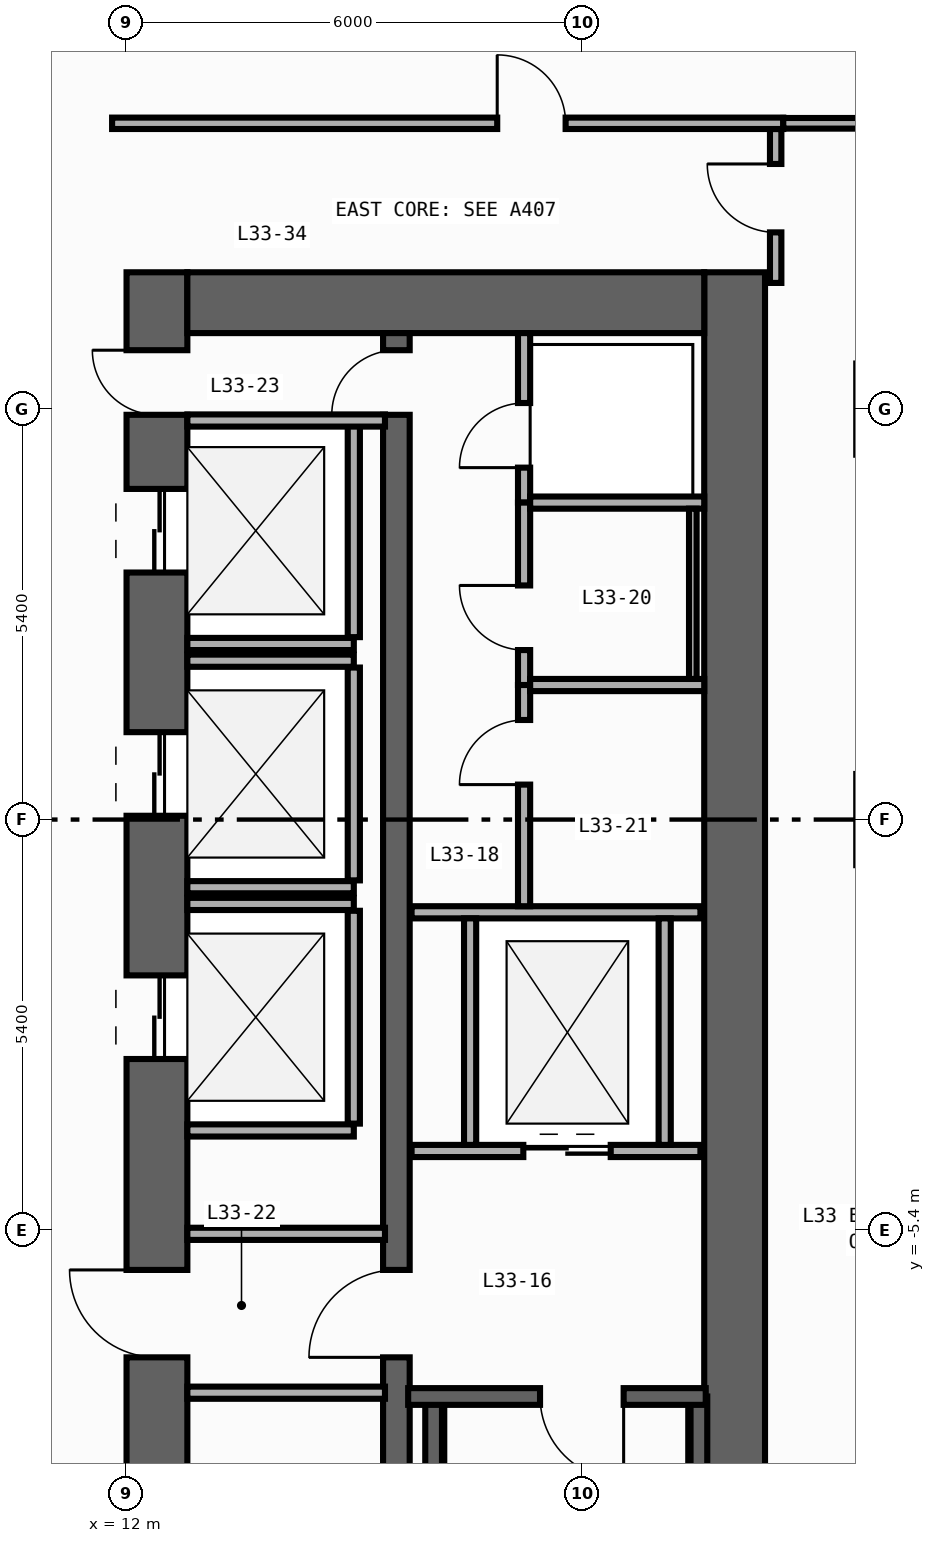
"""IFC4 building model, lengths in metres.
Left out: names, types, materials, properties, quantities, classifications, styles, units other than length and angle.
Written with IfcOpenShell. Run it as: python <this file> out.ifc"""

import sys

from ifc_helpers import new_model, si_unit, direction, frame, frame_2d, origin, origin_2d, place, context, subcontext, project, spatial, rectangle, extrude, element, fill, save


model = new_model("IFC4")
c1 = context("Model", 3, precision=1e-05, world=origin(), true_north=direction((0.0, 1.0)))
c2 = subcontext(c1, "Body", "Model", "MODEL_VIEW")
j1 = project(units=[si_unit("LENGTHUNIT", "METRE"), si_unit("PLANEANGLEUNIT", "RADIAN")], contexts=[c1])
p1 = place(None, origin())
s1 = spatial("IfcSite", under=j1, at=p1, CompositionType="ELEMENT")
p2 = place(p1, origin())
s2 = spatial("IfcBuilding", under=s1, at=p2, CompositionType="ELEMENT")
p3 = place(p2, frame((0.0, 0.0, 143.6)))
s3 = spatial("IfcBuildingStorey", under=s2, at=p3, CompositionType="ELEMENT", Elevation=143.6)
p4 = place(p3, frame((12.4, -19.8, 0.0), z_axis=(0.0, 0.0, 1.0), x_axis=(0.0, 1.0, 0.0)))
e1 = element("IfcWall", 1, at=p4, inside=s3, PredefinedType="SHEAR", context=c2, shape_type="SweptSolid", body=[
    extrude(rectangle(XDim=27.0, YDim=0.8, at=frame_2d((13.5, 0.0))), origin(), (0.0, 0.0, 1.0), 3.94),
])
p5 = place(p4, frame((23.05, 0.0, 0.0)))
e2 = element("IfcOpeningElement", 2, at=p5, cuts=e1, PredefinedType="OPENING", context=c2, shape_type="SweptSolid", body=[
    extrude(rectangle(XDim=1.1, YDim=2.2, at=frame_2d((0.55, 1.1))), frame((0.0, 0.41, 0.0), z_axis=(0.0, -1.0, 0.0), x_axis=(1.0, 0.0, 0.0)), (0.0, 0.0, 1.0), 0.82),
])
p6 = place(p4, frame((19.85, 0.0, 0.0)))
e3 = element("IfcOpeningElement", 3, at=p6, cuts=e1, PredefinedType="OPENING", context=c2, shape_type="SweptSolid", body=[
    extrude(rectangle(XDim=1.1, YDim=2.2, at=frame_2d((0.55, 1.1))), frame((0.0, 0.41, 0.0), z_axis=(0.0, -1.0, 0.0), x_axis=(1.0, 0.0, 0.0)), (0.0, 0.0, 1.0), 0.82),
])
p7 = place(p4, frame((16.65, 0.0, 0.0)))
e4 = element("IfcOpeningElement", 4, at=p7, cuts=e1, PredefinedType="OPENING", context=c2, shape_type="SweptSolid", body=[
    extrude(rectangle(XDim=1.1, YDim=2.2, at=frame_2d((0.55, 1.1))), frame((0.0, 0.41, 0.0), z_axis=(0.0, -1.0, 0.0), x_axis=(1.0, 0.0, 0.0)), (0.0, 0.0, 1.0), 0.82),
])
p8 = place(p4, frame((10.175, 0.0, 0.0)))
e5 = element("IfcOpeningElement", 5, at=p8, cuts=e1, PredefinedType="OPENING", context=c2, shape_type="SweptSolid", body=[
    extrude(rectangle(XDim=0.85, YDim=2.1, at=frame_2d((0.425, 1.05))), frame((0.0, 0.41, 0.0), z_axis=(0.0, -1.0, 0.0), x_axis=(1.0, 0.0, 0.0)), (0.0, 0.0, 1.0), 0.82),
])
p9 = place(p4, frame((12.725, 0.0, 0.0)))
e6 = element("IfcOpeningElement", 6, at=p9, cuts=e1, PredefinedType="OPENING", context=c2, shape_type="SweptSolid", body=[
    extrude(rectangle(XDim=1.15, YDim=2.2, at=frame_2d((0.575, 1.1))), frame((0.0, 0.41, 0.0), z_axis=(0.0, -1.0, 0.0), x_axis=(1.0, 0.0, 0.0)), (0.0, 0.0, 1.0), 0.82),
])
p10 = place(p4, frame((25.125, 0.0, 0.0)))
e7 = element("IfcOpeningElement", 7, at=p10, cuts=e1, PredefinedType="OPENING", context=c2, shape_type="SweptSolid", body=[
    extrude(rectangle(XDim=0.85, YDim=2.1, at=frame_2d((0.425, 1.05))), frame((0.0, 0.41, 0.0), z_axis=(0.0, -1.0, 0.0), x_axis=(1.0, 0.0, 0.0)), (0.0, 0.0, 1.0), 0.82),
])
p11 = place(p3, frame((20.0, -19.8, 0.0), z_axis=(0.0, 0.0, 1.0), x_axis=(0.0, 1.0, 0.0)))
e8 = element("IfcWall", 8, at=p11, inside=s3, PredefinedType="SHEAR", context=c2, shape_type="SweptSolid", body=[
    extrude(rectangle(XDim=27.0, YDim=0.8, at=frame_2d((13.5, 0.0))), origin(), (0.0, 0.0, 1.0), 3.94),
])
p12 = place(p3, frame((12.8, 6.8, 0.0), z_axis=(0.0, 0.0, 1.0), x_axis=(1.0, 0.0, 0.0)))
e9 = element("IfcWall", 9, at=p12, inside=s3, PredefinedType="SHEAR", context=c2, shape_type="SweptSolid", body=[
    extrude(rectangle(XDim=6.8, YDim=0.8, at=frame_2d((3.4, 0.0))), origin(), (0.0, 0.0, 1.0), 3.94),
])
p13 = place(p3, frame((15.55, -19.0, 0.0), z_axis=(0.0, 0.0, 1.0), x_axis=(0.0, 1.0, 0.0)))
e10 = element("IfcWall", 10, at=p13, inside=s3, PredefinedType="SHEAR", context=c2, shape_type="SweptSolid", body=[
    extrude(rectangle(XDim=25.4, YDim=0.35, at=frame_2d((12.7, 0.0))), origin(), (0.0, 0.0, 1.0), 3.94),
])
p14 = place(p13, frame((11.925, 0.0, 0.0)))
e11 = element("IfcOpeningElement", 11, at=p14, cuts=e10, PredefinedType="OPENING", context=c2, shape_type="SweptSolid", body=[
    extrude(rectangle(XDim=1.15, YDim=2.2, at=frame_2d((0.575, 1.1))), frame((0.0, 0.185, 0.0), z_axis=(0.0, -1.0, 0.0), x_axis=(1.0, 0.0, 0.0)), (0.0, 0.0, 1.0), 0.37),
])
p15 = place(p13, frame((24.325, 0.0, 0.0)))
e12 = element("IfcOpeningElement", 12, at=p15, cuts=e10, PredefinedType="OPENING", context=c2, shape_type="SweptSolid", body=[
    extrude(rectangle(XDim=0.85, YDim=2.1, at=frame_2d((0.425, 1.05))), frame((0.0, 0.185, 0.0), z_axis=(0.0, -1.0, 0.0), x_axis=(1.0, 0.0, 0.0)), (0.0, 0.0, 1.0), 0.37),
])
for number, where, z_axis, x_axis in (
    (13, (16.04, -18.89, 0.0), (0.0, 0.0, 1.0), (0.0, 1.0, 0.0)),
    (14, (19.53, -18.89, 0.0), (0.0, 0.0, 1.0), (0.0, 1.0, 0.0)),
):
    element("IfcWall", number, at=place(p3, frame(where, z_axis=z_axis, x_axis=x_axis)), inside=s3, PredefinedType="SHEAR", context=c2, shape_type="SweptSolid", body=[
        extrude(rectangle(XDim=11.3, YDim=0.22, at=frame_2d((5.65, 0.0))), origin(), (0.0, 0.0, 1.0), 3.94),
    ])
p16 = place(p3, frame((19.62, -7.59, 0.0), z_axis=(0.0, 0.0, 1.0), x_axis=(-1.0, 0.0, 0.0)))
e15 = element("IfcWall", 15, at=p16, inside=s3, PredefinedType="SHEAR", context=c2, shape_type="SweptSolid", body=[
    extrude(rectangle(XDim=3.915, YDim=0.22, at=frame_2d((1.958, 0.0))), origin(), (0.0, 0.0, 1.0), 3.94),
])
p17 = place(p16, frame((1.08, 0.0, 0.0)))
e16 = element("IfcOpeningElement", 16, at=p17, cuts=e15, PredefinedType="OPENING", context=c2, shape_type="SweptSolid", body=[
    extrude(rectangle(XDim=1.1, YDim=2.2, at=frame_2d((0.55, 1.1))), frame((0.0, 0.12, 0.0), z_axis=(0.0, -1.0, 0.0), x_axis=(1.0, 0.0, 0.0)), (0.0, 0.0, 1.0), 0.24),
])
for number, where, z_axis, x_axis in (
    (17, (22.2, 0.0, 0.0), (0.0, 0.0, 1.0), (1.0, 0.0, 0.0)),
    (18, (22.2, 5.4, 0.0), (0.0, 0.0, 1.0), (1.0, 0.0, 0.0)),
):
    element("IfcColumn", number, at=place(p3, frame(where, z_axis=z_axis, x_axis=x_axis)), inside=s3, PredefinedType="COLUMN", context=c2, shape_type="SweptSolid", body=[
        extrude(rectangle(XDim=1.2, YDim=1.2, at=origin_2d()), origin(), (0.0, 0.0, 1.0), 4.2),
    ])
p18 = place(p3, frame((12.8, 2.31, 0.0), z_axis=(0.0, 0.0, 1.0), x_axis=(1.0, 0.0, 0.0)))
e19 = element("IfcWall", 19, at=p18, inside=s3, PredefinedType="STANDARD", context=c2, shape_type="SweptSolid", body=[
    extrude(rectangle(XDim=2.19, YDim=0.16, at=frame_2d((1.095, 0.0))), origin(), (0.0, 0.0, 1.0), 3.94),
])
p19 = place(p3, frame((14.99, 2.4, 0.0), z_axis=(0.0, 0.0, 1.0), x_axis=(0.0, 1.0, 0.0)))
e20 = element("IfcWall", 20, at=p19, inside=s3, PredefinedType="STANDARD", context=c2, shape_type="SweptSolid", body=[
    extrude(rectangle(XDim=2.8, YDim=0.16, at=frame_2d((1.4, 0.0))), origin(), (0.0, 0.0, 1.0), 3.94),
])
for number, where, z_axis, x_axis in (
    (21, (12.8, -0.89, 0.0), (0.0, 0.0, 1.0), (1.0, 0.0, 0.0)),
    (22, (12.8, 2.09, 0.0), (0.0, 0.0, 1.0), (1.0, 0.0, 0.0)),
):
    element("IfcWall", number, at=place(p3, frame(where, z_axis=z_axis, x_axis=x_axis)), inside=s3, PredefinedType="STANDARD", context=c2, shape_type="SweptSolid", body=[
        extrude(rectangle(XDim=2.19, YDim=0.16, at=frame_2d((1.095, 0.0))), origin(), (0.0, 0.0, 1.0), 3.94),
    ])
p20 = place(p3, frame((14.99, -0.8, 0.0), z_axis=(0.0, 0.0, 1.0), x_axis=(0.0, 1.0, 0.0)))
e23 = element("IfcWall", 23, at=p20, inside=s3, PredefinedType="STANDARD", context=c2, shape_type="SweptSolid", body=[
    extrude(rectangle(XDim=2.8, YDim=0.16, at=frame_2d((1.4, 0.0))), origin(), (0.0, 0.0, 1.0), 3.94),
])
for number, where, z_axis, x_axis in (
    (24, (12.8, -4.09, 0.0), (0.0, 0.0, 1.0), (1.0, 0.0, 0.0)),
    (25, (12.8, -1.11, 0.0), (0.0, 0.0, 1.0), (1.0, 0.0, 0.0)),
):
    element("IfcWall", number, at=place(p3, frame(where, z_axis=z_axis, x_axis=x_axis)), inside=s3, PredefinedType="STANDARD", context=c2, shape_type="SweptSolid", body=[
        extrude(rectangle(XDim=2.19, YDim=0.16, at=frame_2d((1.095, 0.0))), origin(), (0.0, 0.0, 1.0), 3.94),
    ])
p21 = place(p3, frame((14.99, -4.0, 0.0), z_axis=(0.0, 0.0, 1.0), x_axis=(0.0, 1.0, 0.0)))
e26 = element("IfcWall", 26, at=p21, inside=s3, PredefinedType="STANDARD", context=c2, shape_type="SweptSolid", body=[
    extrude(rectangle(XDim=2.8, YDim=0.16, at=frame_2d((1.4, 0.0))), origin(), (0.0, 0.0, 1.0), 3.94),
])
p22 = place(p3, frame((15.75, -4.36, 0.0), z_axis=(0.0, 0.0, 1.0), x_axis=(1.0, 0.0, 0.0)))
e27 = element("IfcWall", 27, at=p22, inside=s3, PredefinedType="STANDARD", context=c2, shape_type="SweptSolid", body=[
    extrude(rectangle(XDim=3.8, YDim=0.16, at=frame_2d((1.9, 0.0))), origin(), (0.0, 0.0, 1.0), 3.94),
])
p23 = place(p22, frame((1.47, 0.0, 0.0)))
e28 = element("IfcOpeningElement", 28, at=p23, cuts=e27, PredefinedType="OPENING", context=c2, shape_type="SweptSolid", body=[
    extrude(rectangle(XDim=1.15, YDim=2.2, at=frame_2d((0.575, 1.1))), frame((0.0, 0.09, 0.0), z_axis=(0.0, -1.0, 0.0), x_axis=(1.0, 0.0, 0.0)), (0.0, 0.0, 1.0), 0.18),
])
p24 = place(p3, frame((15.75, -1.22, 0.0), z_axis=(0.0, 0.0, 1.0), x_axis=(1.0, 0.0, 0.0)))
e29 = element("IfcWall", 29, at=p24, inside=s3, PredefinedType="STANDARD", context=c2, shape_type="SweptSolid", body=[
    extrude(rectangle(XDim=3.8, YDim=0.16, at=frame_2d((1.9, 0.0))), origin(), (0.0, 0.0, 1.0), 3.94),
])
for number, where, z_axis, x_axis in (
    (30, (16.52, -4.28, 0.0), (0.0, 0.0, 1.0), (0.0, 1.0, 0.0)),
    (31, (19.08, -4.28, 0.0), (0.0, 0.0, 1.0), (0.0, 1.0, 0.0)),
):
    element("IfcWall", number, at=place(p3, frame(where, z_axis=z_axis, x_axis=x_axis)), inside=s3, PredefinedType="STANDARD", context=c2, shape_type="SweptSolid", body=[
        extrude(rectangle(XDim=2.98, YDim=0.16, at=frame_2d((1.49, 0.0))), origin(), (0.0, 0.0, 1.0), 3.94),
    ])
for number, where, z_axis, x_axis in (
    (32, (12.8, -5.45, 0.0), (0.0, 0.0, 1.0), (1.0, 0.0, 0.0)),
    (33, (12.8, -7.54, 0.0), (0.0, 0.0, 1.0), (1.0, 0.0, 0.0)),
    (34, (12.8, 5.25, 0.0), (0.0, 0.0, 1.0), (1.0, 0.0, 0.0)),
):
    element("IfcWall", number, at=place(p3, frame(where, z_axis=z_axis, x_axis=x_axis)), inside=s3, PredefinedType="STANDARD", context=c2, shape_type="SweptSolid", body=[
        extrude(rectangle(XDim=2.6, YDim=0.16, at=frame_2d((1.3, 0.0))), origin(), (0.0, 0.0, 1.0), 3.94),
    ])
p25 = place(p3, frame((17.23, 4.17, 0.0), z_axis=(0.0, 0.0, 1.0), x_axis=(0.0, 1.0, 0.0)))
e35 = element("IfcWall", 35, at=p25, inside=s3, PredefinedType="PARTITIONING", context=c2, shape_type="SweptSolid", body=[
    extrude(rectangle(XDim=2.23, YDim=0.16, at=frame_2d((1.115, 0.0))), origin(), (0.0, 0.0, 1.0), 3.94),
])
p26 = place(p25, frame((0.46, 0.0, 0.0)))
e36 = element("IfcOpeningElement", 36, at=p26, cuts=e35, PredefinedType="OPENING", context=c2, shape_type="SweptSolid", body=[
    extrude(rectangle(XDim=0.85, YDim=2.1, at=frame_2d((0.425, 1.05))), frame((0.0, 0.09, 0.0), z_axis=(0.0, -1.0, 0.0), x_axis=(1.0, 0.0, 0.0)), (0.0, 0.0, 1.0), 0.18),
])
p27 = place(p3, frame((17.23, 1.77, 0.0), z_axis=(0.0, 0.0, 1.0), x_axis=(0.0, 1.0, 0.0)))
e37 = element("IfcWall", 37, at=p27, inside=s3, PredefinedType="PARTITIONING", context=c2, shape_type="SweptSolid", body=[
    extrude(rectangle(XDim=2.4, YDim=0.16, at=frame_2d((1.2, 0.0))), origin(), (0.0, 0.0, 1.0), 3.94),
])
p28 = place(p27, frame((0.46, 0.0, 0.0)))
e38 = element("IfcOpeningElement", 38, at=p28, cuts=e37, PredefinedType="OPENING", context=c2, shape_type="SweptSolid", body=[
    extrude(rectangle(XDim=0.85, YDim=2.1, at=frame_2d((0.425, 1.05))), frame((0.0, 0.09, 0.0), z_axis=(0.0, -1.0, 0.0), x_axis=(1.0, 0.0, 0.0)), (0.0, 0.0, 1.0), 0.18),
])
p29 = place(p3, frame((17.23, -1.14, 0.0), z_axis=(0.0, 0.0, 1.0), x_axis=(0.0, 1.0, 0.0)))
e39 = element("IfcWall", 39, at=p29, inside=s3, PredefinedType="PARTITIONING", context=c2, shape_type="SweptSolid", body=[
    extrude(rectangle(XDim=2.91, YDim=0.16, at=frame_2d((1.455, 0.0))), origin(), (0.0, 0.0, 1.0), 3.94),
])
p30 = place(p29, frame((1.6, 0.0, 0.0)))
e40 = element("IfcOpeningElement", 40, at=p30, cuts=e39, PredefinedType="OPENING", context=c2, shape_type="SweptSolid", body=[
    extrude(rectangle(XDim=0.85, YDim=2.1, at=frame_2d((0.425, 1.05))), frame((0.0, 0.09, 0.0), z_axis=(0.0, -1.0, 0.0), x_axis=(1.0, 0.0, 0.0)), (0.0, 0.0, 1.0), 0.18),
])
for number, where, z_axis, x_axis in (
    (41, (17.31, 4.17, 0.0), (0.0, 0.0, 1.0), (1.0, 0.0, 0.0)),
    (42, (17.31, 1.77, 0.0), (0.0, 0.0, 1.0), (1.0, 0.0, 0.0)),
):
    element("IfcWall", number, at=place(p3, frame(where, z_axis=z_axis, x_axis=x_axis)), inside=s3, PredefinedType="PARTITIONING", context=c2, shape_type="SweptSolid", body=[
        extrude(rectangle(XDim=2.29, YDim=0.16, at=frame_2d((1.145, 0.0))), origin(), (0.0, 0.0, 1.0), 3.94),
    ])
p31 = place(p3, frame((20.54, 7.06, 0.0), z_axis=(0.0, 0.0, 1.0), x_axis=(0.0, 1.0, 0.0)))
e43 = element("IfcWall", 43, at=p31, inside=s3, PredefinedType="PARTITIONING", context=c2, shape_type="SweptSolid", body=[
    extrude(rectangle(XDim=2.025, YDim=0.15, at=frame_2d((1.012, 0.0))), origin(), (0.0, 0.0, 1.0), 3.94),
])
p32 = place(p31, frame((0.665, 0.0, 0.0)))
e44 = element("IfcOpeningElement", 44, at=p32, cuts=e43, PredefinedType="OPENING", context=c2, shape_type="SweptSolid", body=[
    extrude(rectangle(XDim=0.9, YDim=2.15, at=frame_2d((0.45, 1.075))), frame((0.0, 0.085, 0.0), z_axis=(0.0, -1.0, 0.0), x_axis=(1.0, 0.0, 0.0)), (0.0, 0.0, 1.0), 0.17),
])
p33 = place(p3, frame((11.81, 9.16, 0.0), z_axis=(0.0, 0.0, 1.0), x_axis=(1.0, 0.0, 0.0)))
e45 = element("IfcWall", 45, at=p33, inside=s3, PredefinedType="PARTITIONING", context=c2, shape_type="SweptSolid", body=[
    extrude(rectangle(XDim=8.83, YDim=0.15, at=frame_2d((4.415, 0.0))), origin(), (0.0, 0.0, 1.0), 3.94),
])
p34 = place(p33, frame((5.067, 0.0, 0.0)))
e46 = element("IfcOpeningElement", 46, at=p34, cuts=e45, PredefinedType="OPENING", context=c2, shape_type="SweptSolid", body=[
    extrude(rectangle(XDim=0.9, YDim=2.15, at=frame_2d((0.45, 1.075))), frame((0.0, 0.085, 0.0), z_axis=(0.0, -1.0, 0.0), x_axis=(1.0, 0.0, 0.0)), (0.0, 0.0, 1.0), 0.17),
])
p35 = place(p3, frame((20.64, 9.16, 0.0), z_axis=(0.0, 0.0, 1.0), x_axis=(1.0, 0.0, 0.0)))
e47 = element("IfcWall", 47, at=p35, inside=s3, PredefinedType="PARTITIONING", context=c2, shape_type="SweptSolid", body=[
    extrude(rectangle(XDim=2.815, YDim=0.14, at=frame_2d((1.408, 0.0))), origin(), (0.0, 0.0, 1.0), 3.94),
])
p36 = place(p3, frame((19.45, 4.09, 0.0), z_axis=(0.0, 0.0, 1.0), x_axis=(0.0, -1.0, 0.0)))
e48 = element("IfcWall", 48, at=p36, inside=s3, PredefinedType="PARTITIONING", context=c2, shape_type="SweptSolid", body=[
    extrude(rectangle(XDim=2.24, YDim=0.1, at=frame_2d((1.12, 0.0))), origin(), (0.0, 0.0, 1.0), 3.94),
])
p37 = place(p17, origin())
e49 = element("IfcDoor", 49, at=p37, inside=s3, OperationType="SINGLE_SWING_LEFT", PredefinedType="DOOR", context=c2, shape_type="SweptSolid", body=[
    extrude(rectangle(XDim=1.1, YDim=2.2, at=frame_2d((0.55, 1.1))), frame((0.0, 0.025, 0.0), z_axis=(0.0, -1.0, 0.0), x_axis=(1.0, 0.0, 0.0)), (0.0, 0.0, 1.0), 0.05),
])
fill(e16, e49)
p38 = place(p5, origin())
e50 = element("IfcDoor", 50, at=p38, inside=s3, OperationType="DOUBLE_DOOR_SLIDING", PredefinedType="DOOR", context=c2, shape_type="SweptSolid", body=[
    extrude(rectangle(XDim=1.1, YDim=2.2, at=frame_2d((0.55, 1.1))), frame((0.0, 0.025, 0.0), z_axis=(0.0, -1.0, 0.0), x_axis=(1.0, 0.0, 0.0)), (0.0, 0.0, 1.0), 0.05),
])
fill(e2, e50)
p39 = place(p6, origin())
e51 = element("IfcDoor", 51, at=p39, inside=s3, OperationType="DOUBLE_DOOR_SLIDING", PredefinedType="DOOR", context=c2, shape_type="SweptSolid", body=[
    extrude(rectangle(XDim=1.1, YDim=2.2, at=frame_2d((0.55, 1.1))), frame((0.0, 0.025, 0.0), z_axis=(0.0, -1.0, 0.0), x_axis=(1.0, 0.0, 0.0)), (0.0, 0.0, 1.0), 0.05),
])
fill(e3, e51)
p40 = place(p7, origin())
e52 = element("IfcDoor", 52, at=p40, inside=s3, OperationType="DOUBLE_DOOR_SLIDING", PredefinedType="DOOR", context=c2, shape_type="SweptSolid", body=[
    extrude(rectangle(XDim=1.1, YDim=2.2, at=frame_2d((0.55, 1.1))), frame((0.0, 0.025, 0.0), z_axis=(0.0, -1.0, 0.0), x_axis=(1.0, 0.0, 0.0)), (0.0, 0.0, 1.0), 0.05),
])
fill(e4, e52)
p41 = place(p9, origin())
e53 = element("IfcDoor", 53, at=p41, inside=s3, OperationType="SINGLE_SWING_RIGHT", PredefinedType="DOOR", context=c2, shape_type="SweptSolid", body=[
    extrude(rectangle(XDim=1.15, YDim=2.2, at=frame_2d((0.575, 1.1))), frame((0.0, 0.025, 0.0), z_axis=(0.0, -1.0, 0.0), x_axis=(1.0, 0.0, 0.0)), (0.0, 0.0, 1.0), 0.05),
])
fill(e6, e53)
p42 = place(p14, origin())
e54 = element("IfcDoor", 54, at=p42, inside=s3, OperationType="SINGLE_SWING_LEFT", PredefinedType="DOOR", context=c2, shape_type="SweptSolid", body=[
    extrude(rectangle(XDim=1.15, YDim=2.2, at=frame_2d((0.575, 1.1))), frame((0.0, 0.025, 0.0), z_axis=(0.0, -1.0, 0.0), x_axis=(1.0, 0.0, 0.0)), (0.0, 0.0, 1.0), 0.05),
])
fill(e11, e54)
p43 = place(p10, origin())
e55 = element("IfcDoor", 55, at=p43, inside=s3, OperationType="SINGLE_SWING_RIGHT", PredefinedType="DOOR", context=c2, shape_type="SweptSolid", body=[
    extrude(rectangle(XDim=0.85, YDim=2.1, at=frame_2d((0.425, 1.05))), frame((0.0, 0.025, 0.0), z_axis=(0.0, -1.0, 0.0), x_axis=(1.0, 0.0, 0.0)), (0.0, 0.0, 1.0), 0.05),
])
fill(e7, e55)
p44 = place(p15, origin())
e56 = element("IfcDoor", 56, at=p44, inside=s3, OperationType="SINGLE_SWING_LEFT", PredefinedType="DOOR", context=c2, shape_type="SweptSolid", body=[
    extrude(rectangle(XDim=0.85, YDim=2.1, at=frame_2d((0.425, 1.05))), frame((0.0, 0.025, 0.0), z_axis=(0.0, -1.0, 0.0), x_axis=(1.0, 0.0, 0.0)), (0.0, 0.0, 1.0), 0.05),
])
fill(e12, e56)
p45 = place(p23, origin())
e57 = element("IfcDoor", 57, at=p45, inside=s3, OperationType="DOUBLE_DOOR_SLIDING", PredefinedType="DOOR", context=c2, shape_type="SweptSolid", body=[
    extrude(rectangle(XDim=1.15, YDim=2.2, at=frame_2d((0.575, 1.1))), frame((0.0, 0.025, 0.0), z_axis=(0.0, -1.0, 0.0), x_axis=(1.0, 0.0, 0.0)), (0.0, 0.0, 1.0), 0.05),
])
fill(e28, e57)
p46 = place(p26, origin())
e58 = element("IfcDoor", 58, at=p46, inside=s3, OperationType="SINGLE_SWING_LEFT", PredefinedType="DOOR", context=c2, shape_type="SweptSolid", body=[
    extrude(rectangle(XDim=0.85, YDim=2.1, at=frame_2d((0.425, 1.05))), frame((0.0, 0.025, 0.0), z_axis=(0.0, -1.0, 0.0), x_axis=(1.0, 0.0, 0.0)), (0.0, 0.0, 1.0), 0.05),
])
fill(e36, e58)
p47 = place(p28, origin())
e59 = element("IfcDoor", 59, at=p47, inside=s3, OperationType="SINGLE_SWING_RIGHT", PredefinedType="DOOR", context=c2, shape_type="SweptSolid", body=[
    extrude(rectangle(XDim=0.85, YDim=2.1, at=frame_2d((0.425, 1.05))), frame((0.0, 0.025, 0.0), z_axis=(0.0, -1.0, 0.0), x_axis=(1.0, 0.0, 0.0)), (0.0, 0.0, 1.0), 0.05),
])
fill(e38, e59)
p48 = place(p30, origin())
e60 = element("IfcDoor", 60, at=p48, inside=s3, OperationType="SINGLE_SWING_LEFT", PredefinedType="DOOR", context=c2, shape_type="SweptSolid", body=[
    extrude(rectangle(XDim=0.85, YDim=2.1, at=frame_2d((0.425, 1.05))), frame((0.0, 0.025, 0.0), z_axis=(0.0, -1.0, 0.0), x_axis=(1.0, 0.0, 0.0)), (0.0, 0.0, 1.0), 0.05),
])
fill(e40, e60)
p49 = place(p32, origin())
e61 = element("IfcDoor", 61, at=p49, inside=s3, OperationType="SINGLE_SWING_RIGHT", PredefinedType="DOOR", context=c2, shape_type="SweptSolid", body=[
    extrude(rectangle(XDim=0.9, YDim=2.15, at=frame_2d((0.45, 1.075))), frame((0.0, 0.025, 0.0), z_axis=(0.0, -1.0, 0.0), x_axis=(1.0, 0.0, 0.0)), (0.0, 0.0, 1.0), 0.05),
])
fill(e44, e61)
p50 = place(p34, origin())
e62 = element("IfcDoor", 62, at=p50, inside=s3, OperationType="SINGLE_SWING_LEFT", PredefinedType="DOOR", context=c2, shape_type="SweptSolid", body=[
    extrude(rectangle(XDim=0.9, YDim=2.15, at=frame_2d((0.45, 1.075))), frame((0.0, 0.025, 0.0), z_axis=(0.0, -1.0, 0.0), x_axis=(1.0, 0.0, 0.0)), (0.0, 0.0, 1.0), 0.05),
])
fill(e46, e62)
save(model, sys.argv[1])
